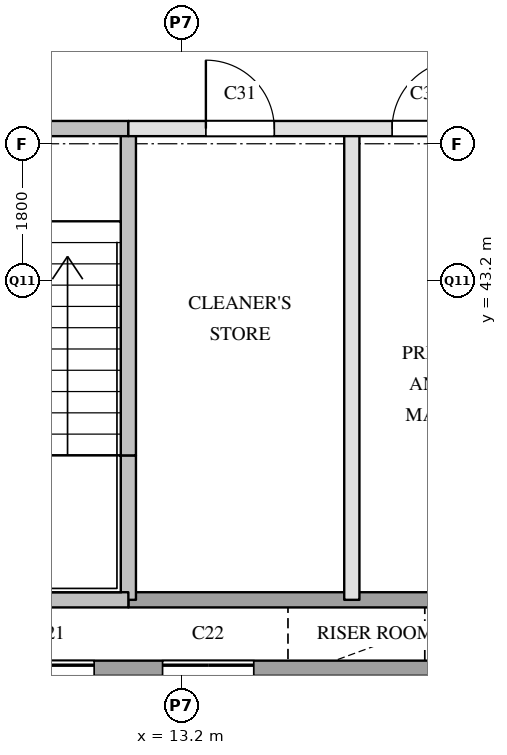
"""IFC4 building model, lengths in metres.
Left out: names, types, materials, properties, quantities, classifications, styles, units other than length and angle.
Written with IfcOpenShell. Run it as: python <this file> out.ifc"""

import sys

from ifc_helpers import new_model, si_unit, direction, frame, frame_2d, origin, place, context, subcontext, project, spatial, rectangle, extrude, element, fill, save


model = new_model("IFC4")
c1 = context("Model", 3, precision=1e-05, world=origin(), true_north=direction((0.0, 1.0)))
c2 = subcontext(c1, "Body", "Model", "MODEL_VIEW")
j1 = project(units=[si_unit("LENGTHUNIT", "METRE"), si_unit("PLANEANGLEUNIT", "RADIAN")], contexts=[c1])
p1 = place(None, origin())
s1 = spatial("IfcSite", under=j1, at=p1, CompositionType="ELEMENT")
p2 = place(p1, origin())
s2 = spatial("IfcBuilding", under=s1, at=p2, CompositionType="ELEMENT")
p3 = place(p2, frame((0.0, 0.0, 81.6)))
s3 = spatial("IfcBuildingStorey", under=s2, at=p3, CompositionType="ELEMENT", Elevation=81.6)
p4 = place(p3, frame((12.5, 34.9, 0.0), z_axis=(0.0, 0.0, 1.0), x_axis=(0.0, 1.0, 0.0)))
e1 = element("IfcWall", 1, at=p4, inside=s3, PredefinedType="SOLIDWALL", context=c2, shape_type="SweptSolid", body=[
    extrude(rectangle(XDim=3.2, YDim=0.2, at=frame_2d((1.6, 0.0))), origin(), (0.0, 0.0, 1.0), 3.5),
])
p5 = place(p3, frame((12.5, 39.0, 0.0), z_axis=(0.0, 0.0, 1.0), x_axis=(0.0, 1.0, 0.0)))
e2 = element("IfcWall", 2, at=p5, inside=s3, PredefinedType="SOLIDWALL", context=c2, shape_type="SweptSolid", body=[
    extrude(rectangle(XDim=1.9, YDim=0.2, at=frame_2d((0.95, 0.0))), origin(), (0.0, 0.0, 1.0), 3.5),
])
p6 = place(p3, frame((12.5, 40.9, 0.0), z_axis=(0.0, 0.0, 1.0), x_axis=(0.0, 1.0, 0.0)))
e3 = element("IfcWall", 3, at=p6, inside=s3, PredefinedType="SOLIDWALL", context=c2, shape_type="SweptSolid", body=[
    extrude(rectangle(XDim=4.3, YDim=0.2, at=frame_2d((2.15, 0.0))), origin(), (0.0, 0.0, 1.0), 3.5),
])
p7 = place(p3, frame((14.6, 34.9, 0.0), z_axis=(0.0, 0.0, 1.0), x_axis=(0.0, 1.0, 0.0)))
e4 = element("IfcWall", 4, at=p7, inside=s3, PredefinedType="SOLIDWALL", context=c2, shape_type="SweptSolid", body=[
    extrude(rectangle(XDim=3.2, YDim=0.2, at=frame_2d((1.6, 0.0))), origin(), (0.0, 0.0, 1.0), 3.5),
])
p8 = place(p3, frame((15.44, 39.0, 0.0), z_axis=(0.0, 0.0, 1.0), x_axis=(0.0, 1.0, 0.0)))
e5 = element("IfcWall", 5, at=p8, inside=s3, PredefinedType="PARTITIONING", context=c2, shape_type="SweptSolid", body=[
    extrude(rectangle(XDim=6.2, YDim=0.2, at=frame_2d((3.1, 0.0))), origin(), (0.0, 0.0, 1.0), 3.5),
])
p9 = place(p3, frame((6.2, 38.1, 0.0), z_axis=(0.0, 0.0, 1.0), x_axis=(1.0, 0.0, 0.0)))
e6 = element("IfcWall", 6, at=p9, inside=s3, PredefinedType="SOLIDWALL", context=c2, shape_type="SweptSolid", body=[
    extrude(rectangle(XDim=11.2, YDim=0.2, at=frame_2d((5.6, 0.0))), origin(), (0.0, 0.0, 1.0), 3.5),
])
p10 = place(p9, frame((0.45, 0.0, 0.0)))
e7 = element("IfcOpeningElement", 7, at=p10, cuts=e6, PredefinedType="OPENING", context=c2, shape_type="SweptSolid", body=[
    extrude(rectangle(XDim=1.2, YDim=2.1, at=frame_2d((0.6, 1.05))), frame((0.0, 0.11, 0.0), z_axis=(0.0, -1.0, 0.0), x_axis=(1.0, 0.0, 0.0)), (0.0, 0.0, 1.0), 0.22),
])
p11 = place(p9, frame((2.55, 0.0, 0.0)))
e8 = element("IfcOpeningElement", 8, at=p11, cuts=e6, PredefinedType="OPENING", context=c2, shape_type="SweptSolid", body=[
    extrude(rectangle(XDim=1.2, YDim=2.1, at=frame_2d((0.6, 1.05))), frame((0.0, 0.11, 0.0), z_axis=(0.0, -1.0, 0.0), x_axis=(1.0, 0.0, 0.0)), (0.0, 0.0, 1.0), 0.22),
])
p12 = place(p9, frame((4.65, 0.0, 0.0)))
e9 = element("IfcOpeningElement", 9, at=p12, cuts=e6, PredefinedType="OPENING", context=c2, shape_type="SweptSolid", body=[
    extrude(rectangle(XDim=1.2, YDim=2.1, at=frame_2d((0.6, 1.05))), frame((0.0, 0.11, 0.0), z_axis=(0.0, -1.0, 0.0), x_axis=(1.0, 0.0, 0.0)), (0.0, 0.0, 1.0), 0.22),
])
p13 = place(p9, frame((6.75, 0.0, 0.0)))
e10 = element("IfcOpeningElement", 10, at=p13, cuts=e6, PredefinedType="OPENING", context=c2, shape_type="SweptSolid", body=[
    extrude(rectangle(XDim=1.2, YDim=2.1, at=frame_2d((0.6, 1.05))), frame((0.0, 0.11, 0.0), z_axis=(0.0, -1.0, 0.0), x_axis=(1.0, 0.0, 0.0)), (0.0, 0.0, 1.0), 0.22),
])
p14 = place(p3, frame((12.5, 39.0, 0.0), z_axis=(0.0, 0.0, 1.0), x_axis=(1.0, 0.0, 0.0)))
e11 = element("IfcWall", 11, at=p14, inside=s3, PredefinedType="SOLIDWALL", context=c2, shape_type="SweptSolid", body=[
    extrude(rectangle(XDim=4.9, YDim=0.2, at=frame_2d((2.45, 0.0))), origin(), (0.0, 0.0, 1.0), 3.5),
])
p15 = place(p3, frame((9.45, 39.0, 0.0), z_axis=(0.0, 0.0, 1.0), x_axis=(1.0, 0.0, 0.0)))
e12 = element("IfcWall", 12, at=p15, inside=s3, PredefinedType="SOLIDWALL", context=c2, shape_type="SweptSolid", body=[
    extrude(rectangle(XDim=3.05, YDim=0.2, at=frame_2d((1.525, 0.0))), origin(), (0.0, 0.0, 1.0), 3.5),
])
p16 = place(p3, frame((12.5, 45.2, 0.0), z_axis=(0.0, 0.0, 1.0), x_axis=(1.0, 0.0, 0.0)))
e13 = element("IfcWall", 13, at=p16, inside=s3, PredefinedType="PARTITIONING", context=c2, shape_type="SweptSolid", body=[
    extrude(rectangle(XDim=4.9, YDim=0.2, at=frame_2d((2.45, 0.0))), origin(), (0.0, 0.0, 1.0), 3.5),
])
p17 = place(p16, frame((1.02, 0.0, 0.0)))
e14 = element("IfcOpeningElement", 14, at=p17, cuts=e13, PredefinedType="OPENING", context=c2, shape_type="SweptSolid", body=[
    extrude(rectangle(XDim=0.9, YDim=2.1, at=frame_2d((0.45, 1.05))), frame((0.0, 0.11, 0.0), z_axis=(0.0, -1.0, 0.0), x_axis=(1.0, 0.0, 0.0)), (0.0, 0.0, 1.0), 0.22),
])
p18 = place(p16, frame((3.47, 0.0, 0.0)))
e15 = element("IfcOpeningElement", 15, at=p18, cuts=e13, PredefinedType="OPENING", context=c2, shape_type="SweptSolid", body=[
    extrude(rectangle(XDim=0.9, YDim=2.1, at=frame_2d((0.45, 1.05))), frame((0.0, 0.11, 0.0), z_axis=(0.0, -1.0, 0.0), x_axis=(1.0, 0.0, 0.0)), (0.0, 0.0, 1.0), 0.22),
])
p19 = place(p3, frame((6.2, 45.2, 0.0), z_axis=(0.0, 0.0, 1.0), x_axis=(1.0, 0.0, 0.0)))
e16 = element("IfcWall", 16, at=p19, inside=s3, PredefinedType="SOLIDWALL", context=c2, shape_type="SweptSolid", body=[
    extrude(rectangle(XDim=6.3, YDim=0.2, at=frame_2d((3.15, 0.0))), origin(), (0.0, 0.0, 1.0), 3.5),
])
p20 = place(p19, frame((1.025, 0.0, 0.0)))
e17 = element("IfcOpeningElement", 17, at=p20, cuts=e16, PredefinedType="OPENING", context=c2, shape_type="SweptSolid", body=[
    extrude(rectangle(XDim=1.1, YDim=2.1, at=frame_2d((0.55, 1.05))), frame((0.0, 0.11, 0.0), z_axis=(0.0, -1.0, 0.0), x_axis=(1.0, 0.0, 0.0)), (0.0, 0.0, 1.0), 0.22),
])
p21 = place(p19, frame((4.175, 0.0, 0.0)))
e18 = element("IfcOpeningElement", 18, at=p21, cuts=e16, PredefinedType="OPENING", context=c2, shape_type="SweptSolid", body=[
    extrude(rectangle(XDim=1.1, YDim=2.1, at=frame_2d((0.55, 1.05))), frame((0.0, 0.11, 0.0), z_axis=(0.0, -1.0, 0.0), x_axis=(1.0, 0.0, 0.0)), (0.0, 0.0, 1.0), 0.22),
])
p22 = place(p12, origin())
e19 = element("IfcDoor", 19, at=p22, inside=s3, OperationType="SLIDING_TO_LEFT", PredefinedType="DOOR", context=c2, shape_type="SweptSolid", body=[
    extrude(rectangle(XDim=1.2, YDim=2.1, at=frame_2d((0.6, 1.05))), frame((0.0, 0.025, 0.0), z_axis=(0.0, -1.0, 0.0), x_axis=(1.0, 0.0, 0.0)), (0.0, 0.0, 1.0), 0.05),
])
fill(e9, e19)
p23 = place(p13, origin())
e20 = element("IfcDoor", 20, at=p23, inside=s3, OperationType="SLIDING_TO_LEFT", PredefinedType="DOOR", context=c2, shape_type="SweptSolid", body=[
    extrude(rectangle(XDim=1.2, YDim=2.1, at=frame_2d((0.6, 1.05))), frame((0.0, 0.025, 0.0), z_axis=(0.0, -1.0, 0.0), x_axis=(1.0, 0.0, 0.0)), (0.0, 0.0, 1.0), 0.05),
])
fill(e10, e20)
p24 = place(p17, origin())
e21 = element("IfcDoor", 21, at=p24, inside=s3, OperationType="SINGLE_SWING_LEFT", PredefinedType="DOOR", context=c2, shape_type="SweptSolid", body=[
    extrude(rectangle(XDim=0.9, YDim=2.1, at=frame_2d((0.45, 1.05))), frame((0.0, 0.025, 0.0), z_axis=(0.0, -1.0, 0.0), x_axis=(1.0, 0.0, 0.0)), (0.0, 0.0, 1.0), 0.05),
])
fill(e14, e21)
p25 = place(p18, origin())
e22 = element("IfcDoor", 22, at=p25, inside=s3, OperationType="SINGLE_SWING_RIGHT", PredefinedType="DOOR", context=c2, shape_type="SweptSolid", body=[
    extrude(rectangle(XDim=0.9, YDim=2.1, at=frame_2d((0.45, 1.05))), frame((0.0, 0.025, 0.0), z_axis=(0.0, -1.0, 0.0), x_axis=(1.0, 0.0, 0.0)), (0.0, 0.0, 1.0), 0.05),
])
fill(e15, e22)
save(model, sys.argv[1])
